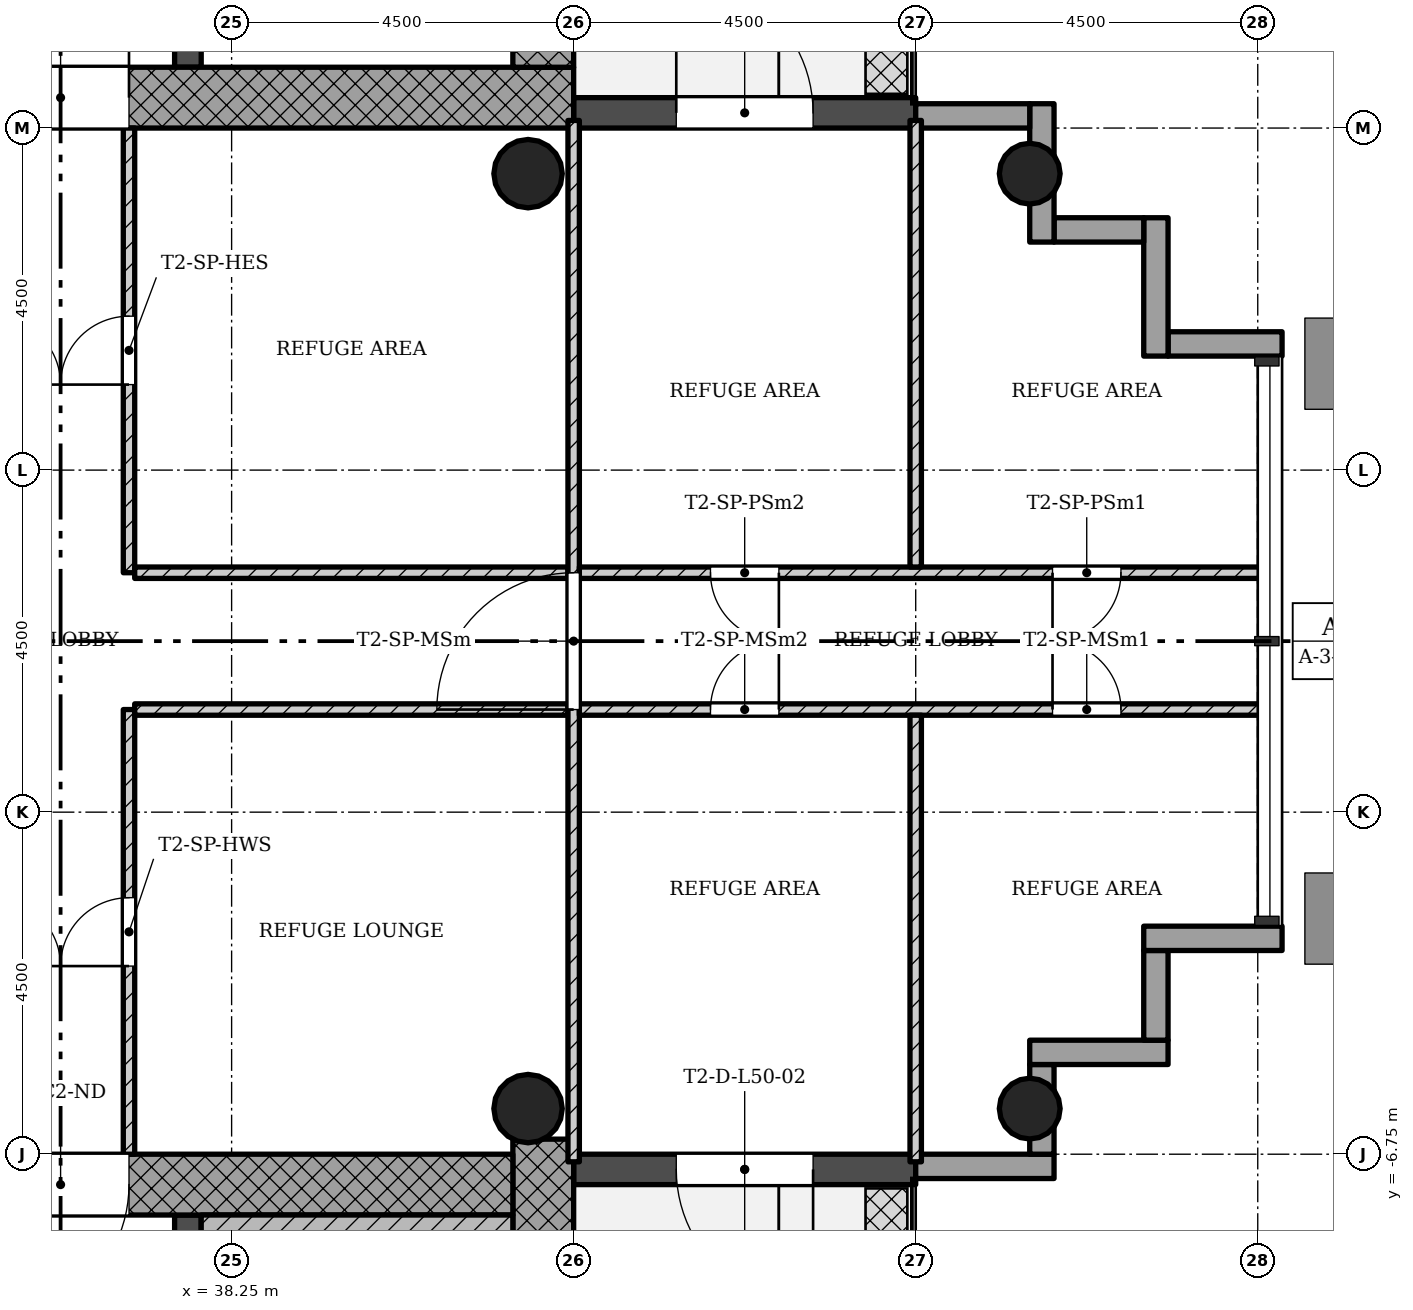
"""IFC4 building model, lengths in metres.
Left out: names, types, materials, properties, quantities, classifications, styles, units other than length and angle.
Written with IfcOpenShell. Run it as: python <this file> out.ifc"""

import sys

from ifc_helpers import new_model, si_unit, direction, frame, frame_2d, origin, origin_2d, place, context, subcontext, project, spatial, rectangle, hollow_circle, extrude, element, fill, save


model = new_model("IFC4")
c1 = context("Model", 3, precision=1e-05, world=origin(), true_north=direction((0.0, 1.0)))
c2 = subcontext(c1, "Body", "Model", "MODEL_VIEW")
j1 = project(units=[si_unit("LENGTHUNIT", "METRE"), si_unit("PLANEANGLEUNIT", "RADIAN")], contexts=[c1])
p1 = place(None, origin())
s1 = spatial("IfcSite", under=j1, at=p1, CompositionType="ELEMENT")
p2 = place(p1, origin())
s2 = spatial("IfcBuilding", under=s1, at=p2, CompositionType="ELEMENT")
p3 = place(p2, frame((0.0, 0.0, 181.3)))
s3 = spatial("IfcBuildingStorey", under=s2, at=p3, CompositionType="ELEMENT", Elevation=181.3)
p4 = place(p3, frame((30.05, 7.15, 0.0), z_axis=(0.0, 0.0, 1.0), x_axis=(1.0, 0.0, 0.0)))
e1 = element("IfcWall", 1, at=p4, inside=s3, PredefinedType="SHEAR", context=c2, shape_type="SweptSolid", body=[
    extrude(rectangle(XDim=12.7, YDim=0.8, at=frame_2d((6.35, 0.0))), origin(), (0.0, 0.0, 1.0), 4.5),
])
p5 = place(p4, frame((5.05, 0.0, 0.0)))
e2 = element("IfcOpeningElement", 2, at=p5, cuts=e1, PredefinedType="OPENING", context=c2, shape_type="SweptSolid", body=[
    extrude(rectangle(XDim=1.8, YDim=2.1, at=frame_2d((0.9, 1.05))), frame((0.0, 0.41, 0.0), z_axis=(0.0, -1.0, 0.0), x_axis=(1.0, 0.0, 0.0)), (0.0, 0.0, 1.0), 0.82),
])
p6 = place(p3, frame((42.35, 7.55, 0.0), z_axis=(0.0, 0.0, 1.0), x_axis=(0.0, 1.0, 0.0)))
e3 = element("IfcWall", 3, at=p6, inside=s3, PredefinedType="SHEAR", context=c2, shape_type="SweptSolid", body=[
    extrude(rectangle(XDim=8.2, YDim=0.8, at=frame_2d((4.1, 0.0))), origin(), (0.0, 0.0, 1.0), 4.5),
])
p7 = place(p3, frame((37.675, 7.55, 0.0), z_axis=(0.0, 0.0, 1.0), x_axis=(0.0, 1.0, 0.0)))
e4 = element("IfcWall", 4, at=p7, inside=s3, PredefinedType="SHEAR", context=c2, shape_type="SweptSolid", body=[
    extrude(rectangle(XDim=7.4, YDim=0.35, at=frame_2d((3.7, 0.0))), origin(), (0.0, 0.0, 1.0), 4.5),
])
p8 = place(p7, frame((0.95, 0.0, 0.0)))
e5 = element("IfcOpeningElement", 5, at=p8, cuts=e4, PredefinedType="OPENING", context=c2, shape_type="SweptSolid", body=[
    extrude(rectangle(XDim=1.1, YDim=2.1, at=frame_2d((0.55, 1.05))), frame((0.0, 0.185, 0.0), z_axis=(0.0, -1.0, 0.0), x_axis=(1.0, 0.0, 0.0)), (0.0, 0.0, 1.0), 0.37),
])
p9 = place(p7, frame((3.15, 0.0, 0.0)))
e6 = element("IfcOpeningElement", 6, at=p9, cuts=e4, PredefinedType="OPENING", context=c2, shape_type="SweptSolid", body=[
    extrude(rectangle(XDim=1.1, YDim=2.1, at=frame_2d((0.55, 1.05))), frame((0.0, 0.185, 0.0), z_axis=(0.0, -1.0, 0.0), x_axis=(1.0, 0.0, 0.0)), (0.0, 0.0, 1.0), 0.37),
])
p10 = place(p7, frame((5.35, 0.0, 0.0)))
e7 = element("IfcOpeningElement", 7, at=p10, cuts=e4, PredefinedType="OPENING", context=c2, shape_type="SweptSolid", body=[
    extrude(rectangle(XDim=1.1, YDim=2.1, at=frame_2d((0.55, 1.05))), frame((0.0, 0.185, 0.0), z_axis=(0.0, -1.0, 0.0), x_axis=(1.0, 0.0, 0.0)), (0.0, 0.0, 1.0), 0.37),
])
p11 = place(p3, frame((42.35, -14.95, 0.0), z_axis=(0.0, 0.0, 1.0), x_axis=(0.0, 1.0, 0.0)))
e8 = element("IfcWall", 8, at=p11, inside=s3, PredefinedType="SHEAR", context=c2, shape_type="SweptSolid", body=[
    extrude(rectangle(XDim=8.398, YDim=0.8, at=frame_2d((4.199, 0.0))), origin(), (0.0, 0.0, 1.0), 4.5),
])
p12 = place(p3, frame((41.95, -7.15, 0.0), z_axis=(0.0, 0.0, 1.0), x_axis=(-1.0, 0.0, 0.0)))
e9 = element("IfcWall", 9, at=p12, inside=s3, PredefinedType="SHEAR", context=c2, shape_type="SweptSolid", body=[
    extrude(rectangle(XDim=12.7, YDim=0.8, at=frame_2d((6.35, 0.0))), origin(), (0.0, 0.0, 1.0), 4.5),
])
p13 = place(p12, frame((5.05, 0.0, 0.0)))
e10 = element("IfcOpeningElement", 10, at=p13, cuts=e9, PredefinedType="OPENING", context=c2, shape_type="SweptSolid", body=[
    extrude(rectangle(XDim=1.8, YDim=2.1, at=frame_2d((0.9, 1.05))), frame((0.0, 0.41, 0.0), z_axis=(0.0, -1.0, 0.0), x_axis=(1.0, 0.0, 0.0)), (0.0, 0.0, 1.0), 0.82),
])
p14 = place(p3, frame((37.675, -14.95, 0.0), z_axis=(0.0, 0.0, 1.0), x_axis=(0.0, 1.0, 0.0)))
e11 = element("IfcWall", 11, at=p14, inside=s3, PredefinedType="SHEAR", context=c2, shape_type="SweptSolid", body=[
    extrude(rectangle(XDim=7.4, YDim=0.35, at=frame_2d((3.7, 0.0))), origin(), (0.0, 0.0, 1.0), 4.5),
])
p15 = place(p14, frame((5.65, 0.0, 0.0)))
e12 = element("IfcOpeningElement", 12, at=p15, cuts=e11, PredefinedType="OPENING", context=c2, shape_type="SweptSolid", body=[
    extrude(rectangle(XDim=0.9, YDim=2.1, at=frame_2d((0.45, 1.05))), frame((0.0, 0.185, 0.0), z_axis=(0.0, -1.0, 0.0), x_axis=(1.0, 0.0, 0.0)), (0.0, 0.0, 1.0), 0.37),
])
for number, where, z_axis, x_axis in (
    (13, (48.75, -6.15, 0.0), (0.0, 0.0, 1.0), (1.0, 0.0, 0.0)),
    (14, (48.75, 6.15, 0.0), (0.0, 0.0, 1.0), (1.0, 0.0, 0.0)),
):
    element("IfcColumn", number, at=place(p3, frame(where, z_axis=z_axis, x_axis=x_axis)), inside=s3, PredefinedType="COLUMN", context=c2, shape_type="SweptSolid", body=[
        extrude(hollow_circle(Radius=0.4, WallThickness=0.028, at=origin_2d()), origin(), (0.0, 0.0, 1.0), 4.5),
    ])
for number, where, z_axis, x_axis in (
    (15, (42.15, -6.15, 0.0), (0.0, 0.0, 1.0), (1.0, 0.0, 0.0)),
    (16, (42.15, 6.15, 0.0), (0.0, 0.0, 1.0), (1.0, 0.0, 0.0)),
):
    element("IfcColumn", number, at=place(p3, frame(where, z_axis=z_axis, x_axis=x_axis)), inside=s3, PredefinedType="COLUMN", context=c2, shape_type="SweptSolid", body=[
        extrude(hollow_circle(Radius=0.45, WallThickness=0.032, at=origin_2d()), origin(), (0.0, 0.0, 1.0), 4.5),
    ])
p16 = place(p3, frame((42.75, -6.95, -0.02), z_axis=(0.0, 0.0, 1.0), x_axis=(1.0, 0.0, 0.0)))
e17 = element("IfcWall", 17, at=p16, inside=s3, PredefinedType="STANDARD", context=c2, shape_type="SweptSolid", body=[
    extrude(rectangle(XDim=4.5, YDim=0.4, at=frame_2d((2.25, 0.0))), origin(), (0.0, 0.0, 1.0), 4.22),
])
p17 = place(p16, frame((1.35, 0.0, 0.02)))
e18 = element("IfcOpeningElement", 18, at=p17, cuts=e17, PredefinedType="OPENING", context=c2, shape_type="SweptSolid", body=[
    extrude(rectangle(XDim=1.8, YDim=2.1, at=frame_2d((0.9, 1.05))), frame((0.0, 0.21, 0.0), z_axis=(0.0, -1.0, 0.0), x_axis=(1.0, 0.0, 0.0)), (0.0, 0.0, 1.0), 0.42),
])
p18 = place(p3, frame((47.25, -6.91, -0.3), z_axis=(0.0, 0.0, 1.0), x_axis=(1.0, 0.0, 0.0)))
e19 = element("IfcWall", 19, at=p18, inside=s3, PredefinedType="STANDARD", context=c2, shape_type="SweptSolid", body=[
    extrude(rectangle(XDim=1.82, YDim=0.32, at=frame_2d((0.91, 0.0))), origin(), (0.0, 0.0, 1.0), 4.5),
])
p19 = place(p3, frame((48.91, -6.75, -0.3), z_axis=(0.0, 0.0, 1.0), x_axis=(0.0, 1.0, 0.0)))
e20 = element("IfcWall", 20, at=p19, inside=s3, PredefinedType="STANDARD", context=c2, shape_type="SweptSolid", body=[
    extrude(rectangle(XDim=1.18, YDim=0.32, at=frame_2d((0.59, 0.0))), origin(), (0.0, 0.0, 1.0), 4.5),
])
p20 = place(p3, frame((48.75, -5.41, -0.3), z_axis=(0.0, 0.0, 1.0), x_axis=(1.0, 0.0, 0.0)))
e21 = element("IfcWall", 21, at=p20, inside=s3, PredefinedType="STANDARD", context=c2, shape_type="SweptSolid", body=[
    extrude(rectangle(XDim=1.82, YDim=0.32, at=frame_2d((0.91, 0.0))), origin(), (0.0, 0.0, 1.0), 4.5),
])
p21 = place(p3, frame((50.41, -5.25, -0.3), z_axis=(0.0, 0.0, 1.0), x_axis=(0.0, 1.0, 0.0)))
e22 = element("IfcWall", 22, at=p21, inside=s3, PredefinedType="STANDARD", context=c2, shape_type="SweptSolid", body=[
    extrude(rectangle(XDim=1.18, YDim=0.32, at=frame_2d((0.59, 0.0))), origin(), (0.0, 0.0, 1.0), 4.5),
])
p22 = place(p3, frame((50.25, -3.91, -0.3), z_axis=(0.0, 0.0, 1.0), x_axis=(1.0, 0.0, 0.0)))
e23 = element("IfcWall", 23, at=p22, inside=s3, PredefinedType="STANDARD", context=c2, shape_type="SweptSolid", body=[
    extrude(rectangle(XDim=1.82, YDim=0.32, at=frame_2d((0.91, 0.0))), origin(), (0.0, 0.0, 1.0), 4.5),
])
p23 = place(p3, frame((52.07, 3.91, -0.3), z_axis=(0.0, 0.0, 1.0), x_axis=(-1.0, 0.0, 0.0)))
e24 = element("IfcWall", 24, at=p23, inside=s3, PredefinedType="STANDARD", context=c2, shape_type="SweptSolid", body=[
    extrude(rectangle(XDim=1.5, YDim=0.32, at=frame_2d((0.75, 0.0))), origin(), (0.0, 0.0, 1.0), 4.5),
])
p24 = place(p3, frame((50.41, 3.75, -0.3), z_axis=(0.0, 0.0, 1.0), x_axis=(0.0, 1.0, 0.0)))
e25 = element("IfcWall", 25, at=p24, inside=s3, PredefinedType="STANDARD", context=c2, shape_type="SweptSolid", body=[
    extrude(rectangle(XDim=1.82, YDim=0.32, at=frame_2d((0.91, 0.0))), origin(), (0.0, 0.0, 1.0), 4.5),
])
p25 = place(p3, frame((50.25, 5.41, -0.3), z_axis=(0.0, 0.0, 1.0), x_axis=(-1.0, 0.0, 0.0)))
e26 = element("IfcWall", 26, at=p25, inside=s3, PredefinedType="STANDARD", context=c2, shape_type="SweptSolid", body=[
    extrude(rectangle(XDim=1.18, YDim=0.32, at=frame_2d((0.59, 0.0))), origin(), (0.0, 0.0, 1.0), 4.5),
])
p26 = place(p3, frame((48.91, 5.25, -0.3), z_axis=(0.0, 0.0, 1.0), x_axis=(0.0, 1.0, 0.0)))
e27 = element("IfcWall", 27, at=p26, inside=s3, PredefinedType="STANDARD", context=c2, shape_type="SweptSolid", body=[
    extrude(rectangle(XDim=1.82, YDim=0.32, at=frame_2d((0.91, 0.0))), origin(), (0.0, 0.0, 1.0), 4.5),
])
p27 = place(p3, frame((48.75, 6.91, -0.3), z_axis=(0.0, 0.0, 1.0), x_axis=(-1.0, 0.0, 0.0)))
e28 = element("IfcWall", 28, at=p27, inside=s3, PredefinedType="STANDARD", context=c2, shape_type="SweptSolid", body=[
    extrude(rectangle(XDim=1.5, YDim=0.32, at=frame_2d((0.75, 0.0))), origin(), (0.0, 0.0, 1.0), 4.5),
])
p28 = place(p3, frame((47.25, 6.95, -0.02), z_axis=(0.0, 0.0, 1.0), x_axis=(-1.0, 0.0, 0.0)))
e29 = element("IfcWall", 29, at=p28, inside=s3, PredefinedType="STANDARD", context=c2, shape_type="SweptSolid", body=[
    extrude(rectangle(XDim=4.5, YDim=0.4, at=frame_2d((2.25, 0.0))), origin(), (0.0, 0.0, 1.0), 4.22),
])
p29 = place(p28, frame((1.35, 0.0, 0.02)))
e30 = element("IfcOpeningElement", 30, at=p29, cuts=e29, PredefinedType="OPENING", context=c2, shape_type="SweptSolid", body=[
    extrude(rectangle(XDim=1.8, YDim=2.1, at=frame_2d((0.9, 1.05))), frame((0.0, 0.21, 0.0), z_axis=(0.0, -1.0, 0.0), x_axis=(1.0, 0.0, 0.0)), (0.0, 0.0, 1.0), 0.42),
])
p30 = place(p3, frame((36.9, 0.9, 0.0), z_axis=(0.0, 0.0, 1.0), x_axis=(0.0, 1.0, 0.0)))
e31 = element("IfcWall", 31, at=p30, inside=s3, PredefinedType="PARTITIONING", context=c2, shape_type="SweptSolid", body=[
    extrude(rectangle(XDim=5.85, YDim=0.15, at=frame_2d((2.925, 0.0))), origin(), (0.0, 0.0, 1.0), 4.08),
])
p31 = place(p30, frame((2.475, 0.0, 0.0)))
e32 = element("IfcOpeningElement", 32, at=p31, cuts=e31, PredefinedType="OPENING", context=c2, shape_type="SweptSolid", body=[
    extrude(rectangle(XDim=0.9, YDim=2.1, at=frame_2d((0.45, 1.05))), frame((0.0, 0.085, 0.0), z_axis=(0.0, -1.0, 0.0), x_axis=(1.0, 0.0, 0.0)), (0.0, 0.0, 1.0), 0.17),
])
p32 = place(p3, frame((42.675, 0.9, 0.0), z_axis=(0.0, 0.0, 1.0), x_axis=(-1.0, 0.0, 0.0)))
e33 = element("IfcWall", 33, at=p32, inside=s3, PredefinedType="PARTITIONING", context=c2, shape_type="SweptSolid", body=[
    extrude(rectangle(XDim=5.7, YDim=0.15, at=frame_2d((2.85, 0.0))), origin(), (0.0, 0.0, 1.0), 4.08),
])
p33 = place(p3, frame((36.9, -6.75, 0.0), z_axis=(0.0, 0.0, 1.0), x_axis=(0.0, 1.0, 0.0)))
e34 = element("IfcWall", 34, at=p33, inside=s3, PredefinedType="PARTITIONING", context=c2, shape_type="SweptSolid", body=[
    extrude(rectangle(XDim=5.85, YDim=0.15, at=frame_2d((2.925, 0.0))), origin(), (0.0, 0.0, 1.0), 4.08),
])
p34 = place(p33, frame((2.475, 0.0, 0.0)))
e35 = element("IfcOpeningElement", 35, at=p34, cuts=e34, PredefinedType="OPENING", context=c2, shape_type="SweptSolid", body=[
    extrude(rectangle(XDim=0.9, YDim=2.1, at=frame_2d((0.45, 1.05))), frame((0.0, 0.085, 0.0), z_axis=(0.0, -1.0, 0.0), x_axis=(1.0, 0.0, 0.0)), (0.0, 0.0, 1.0), 0.17),
])
p35 = place(p3, frame((42.675, -0.9, 0.0), z_axis=(0.0, 0.0, 1.0), x_axis=(-1.0, 0.0, 0.0)))
e36 = element("IfcWall", 36, at=p35, inside=s3, PredefinedType="PARTITIONING", context=c2, shape_type="SweptSolid", body=[
    extrude(rectangle(XDim=5.7, YDim=0.15, at=frame_2d((2.85, 0.0))), origin(), (0.0, 0.0, 1.0), 4.08),
])
p36 = place(p3, frame((42.75, -6.85, 0.0), z_axis=(0.0, 0.0, 1.0), x_axis=(0.0, 1.0, 0.0)))
e37 = element("IfcWall", 37, at=p36, inside=s3, PredefinedType="PARTITIONING", context=c2, shape_type="SweptSolid", body=[
    extrude(rectangle(XDim=13.7, YDim=0.15, at=frame_2d((6.85, 0.0))), origin(), (0.0, 0.0, 1.0), 4.08),
])
p37 = place(p36, frame((5.95, 0.0, 0.0)))
e38 = element("IfcOpeningElement", 38, at=p37, cuts=e37, PredefinedType="OPENING", context=c2, shape_type="SweptSolid", body=[
    extrude(rectangle(XDim=1.8, YDim=2.1, at=frame_2d((0.9, 1.05))), frame((0.0, 0.085, 0.0), z_axis=(0.0, -1.0, 0.0), x_axis=(1.0, 0.0, 0.0)), (0.0, 0.0, 1.0), 0.17),
])
p38 = place(p3, frame((51.85, 0.9, 0.0), z_axis=(0.0, 0.0, 1.0), x_axis=(-1.0, 0.0, 0.0)))
e39 = element("IfcWall", 39, at=p38, inside=s3, PredefinedType="PARTITIONING", context=c2, shape_type="SweptSolid", body=[
    extrude(rectangle(XDim=9.025, YDim=0.15, at=frame_2d((4.513, 0.0))), origin(), (0.0, 0.0, 1.0), 4.08),
])
p39 = place(p38, frame((1.9, 0.0, 0.0)))
e40 = element("IfcOpeningElement", 40, at=p39, cuts=e39, PredefinedType="OPENING", context=c2, shape_type="SweptSolid", body=[
    extrude(rectangle(XDim=0.9, YDim=2.1, at=frame_2d((0.45, 1.05))), frame((0.0, 0.085, 0.0), z_axis=(0.0, -1.0, 0.0), x_axis=(1.0, 0.0, 0.0)), (0.0, 0.0, 1.0), 0.17),
])
p40 = place(p38, frame((6.4, 0.0, 0.0)))
e41 = element("IfcOpeningElement", 41, at=p40, cuts=e39, PredefinedType="OPENING", context=c2, shape_type="SweptSolid", body=[
    extrude(rectangle(XDim=0.9, YDim=2.1, at=frame_2d((0.45, 1.05))), frame((0.0, 0.085, 0.0), z_axis=(0.0, -1.0, 0.0), x_axis=(1.0, 0.0, 0.0)), (0.0, 0.0, 1.0), 0.17),
])
p41 = place(p3, frame((47.25, 0.975, 0.0), z_axis=(0.0, 0.0, 1.0), x_axis=(0.0, 1.0, 0.0)))
e42 = element("IfcWall", 42, at=p41, inside=s3, PredefinedType="PARTITIONING", context=c2, shape_type="SweptSolid", body=[
    extrude(rectangle(XDim=5.875, YDim=0.15, at=frame_2d((2.938, 0.0))), origin(), (0.0, 0.0, 1.0), 4.08),
])
p42 = place(p3, frame((51.85, -0.9, 0.0), z_axis=(0.0, 0.0, 1.0), x_axis=(-1.0, 0.0, 0.0)))
e43 = element("IfcWall", 43, at=p42, inside=s3, PredefinedType="PARTITIONING", context=c2, shape_type="SweptSolid", body=[
    extrude(rectangle(XDim=9.025, YDim=0.15, at=frame_2d((4.513, 0.0))), origin(), (0.0, 0.0, 1.0), 4.08),
])
p43 = place(p42, frame((1.9, 0.0, 0.0)))
e44 = element("IfcOpeningElement", 44, at=p43, cuts=e43, PredefinedType="OPENING", context=c2, shape_type="SweptSolid", body=[
    extrude(rectangle(XDim=0.9, YDim=2.1, at=frame_2d((0.45, 1.05))), frame((0.0, 0.085, 0.0), z_axis=(0.0, -1.0, 0.0), x_axis=(1.0, 0.0, 0.0)), (0.0, 0.0, 1.0), 0.17),
])
p44 = place(p42, frame((6.4, 0.0, 0.0)))
e45 = element("IfcOpeningElement", 45, at=p44, cuts=e43, PredefinedType="OPENING", context=c2, shape_type="SweptSolid", body=[
    extrude(rectangle(XDim=0.9, YDim=2.1, at=frame_2d((0.45, 1.05))), frame((0.0, 0.085, 0.0), z_axis=(0.0, -1.0, 0.0), x_axis=(1.0, 0.0, 0.0)), (0.0, 0.0, 1.0), 0.17),
])
p45 = place(p3, frame((47.25, -0.975, 0.0), z_axis=(0.0, 0.0, 1.0), x_axis=(0.0, -1.0, 0.0)))
e46 = element("IfcWall", 46, at=p45, inside=s3, PredefinedType="PARTITIONING", context=c2, shape_type="SweptSolid", body=[
    extrude(rectangle(XDim=5.875, YDim=0.15, at=frame_2d((2.938, 0.0))), origin(), (0.0, 0.0, 1.0), 4.08),
])
p46 = place(p3, frame((37.85, -7.75, 0.0), z_axis=(0.0, 0.0, 1.0), x_axis=(1.0, 0.0, 0.0)))
e47 = element("IfcWall", 47, at=p46, inside=s3, PredefinedType="SHEAR", context=c2, shape_type="SweptSolid", body=[
    extrude(rectangle(XDim=4.1, YDim=0.4, at=frame_2d((2.05, 0.0))), origin(), (0.0, 0.0, 1.0), 4.5),
])
p47 = place(p17, origin())
e48 = element("IfcDoor", 48, at=p47, inside=s3, OperationType="SINGLE_SWING_RIGHT", PredefinedType="DOOR", context=c2, shape_type="SweptSolid", body=[
    extrude(rectangle(XDim=1.8, YDim=2.1, at=frame_2d((0.9, 1.05))), frame((0.0, 0.025, 0.0), z_axis=(0.0, -1.0, 0.0), x_axis=(1.0, 0.0, 0.0)), (0.0, 0.0, 1.0), 0.05),
])
fill(e18, e48)
p48 = place(p29, origin())
e49 = element("IfcDoor", 49, at=p48, inside=s3, OperationType="SINGLE_SWING_RIGHT", PredefinedType="DOOR", context=c2, shape_type="SweptSolid", body=[
    extrude(rectangle(XDim=1.8, YDim=2.1, at=frame_2d((0.9, 1.05))), frame((0.0, 0.025, 0.0), z_axis=(0.0, -1.0, 0.0), x_axis=(1.0, 0.0, 0.0)), (0.0, 0.0, 1.0), 0.05),
])
fill(e30, e49)
p49 = place(p31, origin())
e50 = element("IfcDoor", 50, at=p49, inside=s3, OperationType="SINGLE_SWING_RIGHT", PredefinedType="DOOR", context=c2, shape_type="SweptSolid", body=[
    extrude(rectangle(XDim=0.9, YDim=2.1, at=frame_2d((0.45, 1.05))), frame((0.0, 0.025, 0.0), z_axis=(0.0, -1.0, 0.0), x_axis=(1.0, 0.0, 0.0)), (0.0, 0.0, 1.0), 0.05),
])
fill(e32, e50)
p50 = place(p34, origin())
e51 = element("IfcDoor", 51, at=p50, inside=s3, OperationType="SINGLE_SWING_RIGHT", PredefinedType="DOOR", context=c2, shape_type="SweptSolid", body=[
    extrude(rectangle(XDim=0.9, YDim=2.1, at=frame_2d((0.45, 1.05))), frame((0.0, 0.025, 0.0), z_axis=(0.0, -1.0, 0.0), x_axis=(1.0, 0.0, 0.0)), (0.0, 0.0, 1.0), 0.05),
])
fill(e35, e51)
p51 = place(p37, origin())
e52 = element("IfcDoor", 52, at=p51, inside=s3, OperationType="SINGLE_SWING_RIGHT", PredefinedType="DOOR", context=c2, shape_type="SweptSolid", body=[
    extrude(rectangle(XDim=1.8, YDim=2.1, at=frame_2d((0.9, 1.05))), frame((0.0, 0.025, 0.0), z_axis=(0.0, -1.0, 0.0), x_axis=(1.0, 0.0, 0.0)), (0.0, 0.0, 1.0), 0.05),
])
fill(e38, e52)
p52 = place(p39, origin())
e53 = element("IfcDoor", 53, at=p52, inside=s3, OperationType="SINGLE_SWING_LEFT", PredefinedType="DOOR", context=c2, shape_type="SweptSolid", body=[
    extrude(rectangle(XDim=0.9, YDim=2.1, at=frame_2d((0.45, 1.05))), frame((0.0, 0.025, 0.0), z_axis=(0.0, -1.0, 0.0), x_axis=(1.0, 0.0, 0.0)), (0.0, 0.0, 1.0), 0.05),
])
fill(e40, e53)
p53 = place(p40, origin())
e54 = element("IfcDoor", 54, at=p53, inside=s3, OperationType="SINGLE_SWING_RIGHT", PredefinedType="DOOR", context=c2, shape_type="SweptSolid", body=[
    extrude(rectangle(XDim=0.9, YDim=2.1, at=frame_2d((0.45, 1.05))), frame((0.0, 0.025, 0.0), z_axis=(0.0, -1.0, 0.0), x_axis=(1.0, 0.0, 0.0)), (0.0, 0.0, 1.0), 0.05),
])
fill(e41, e54)
p54 = place(p43, origin())
e55 = element("IfcDoor", 55, at=p54, inside=s3, OperationType="SINGLE_SWING_RIGHT", PredefinedType="DOOR", context=c2, shape_type="SweptSolid", body=[
    extrude(rectangle(XDim=0.9, YDim=2.1, at=frame_2d((0.45, 1.05))), frame((0.0, 0.025, 0.0), z_axis=(0.0, -1.0, 0.0), x_axis=(1.0, 0.0, 0.0)), (0.0, 0.0, 1.0), 0.05),
])
fill(e44, e55)
p55 = place(p44, origin())
e56 = element("IfcDoor", 56, at=p55, inside=s3, OperationType="SINGLE_SWING_LEFT", PredefinedType="DOOR", context=c2, shape_type="SweptSolid", body=[
    extrude(rectangle(XDim=0.9, YDim=2.1, at=frame_2d((0.45, 1.05))), frame((0.0, 0.025, 0.0), z_axis=(0.0, -1.0, 0.0), x_axis=(1.0, 0.0, 0.0)), (0.0, 0.0, 1.0), 0.05),
])
fill(e45, e56)
p56 = place(p5, origin())
e57 = element("IfcDoor", 57, at=p56, inside=s3, OperationType="SINGLE_SWING_LEFT", PredefinedType="DOOR", context=c2, shape_type="SweptSolid", body=[
    extrude(rectangle(XDim=1.8, YDim=2.1, at=frame_2d((0.9, 1.05))), frame((0.0, 0.025, 0.0), z_axis=(0.0, -1.0, 0.0), x_axis=(1.0, 0.0, 0.0)), (0.0, 0.0, 1.0), 0.05),
])
fill(e2, e57)
p57 = place(p13, origin())
e58 = element("IfcDoor", 58, at=p57, inside=s3, OperationType="SINGLE_SWING_LEFT", PredefinedType="DOOR", context=c2, shape_type="SweptSolid", body=[
    extrude(rectangle(XDim=1.8, YDim=2.1, at=frame_2d((0.9, 1.05))), frame((0.0, 0.025, 0.0), z_axis=(0.0, -1.0, 0.0), x_axis=(1.0, 0.0, 0.0)), (0.0, 0.0, 1.0), 0.05),
])
fill(e10, e58)
save(model, sys.argv[1])
